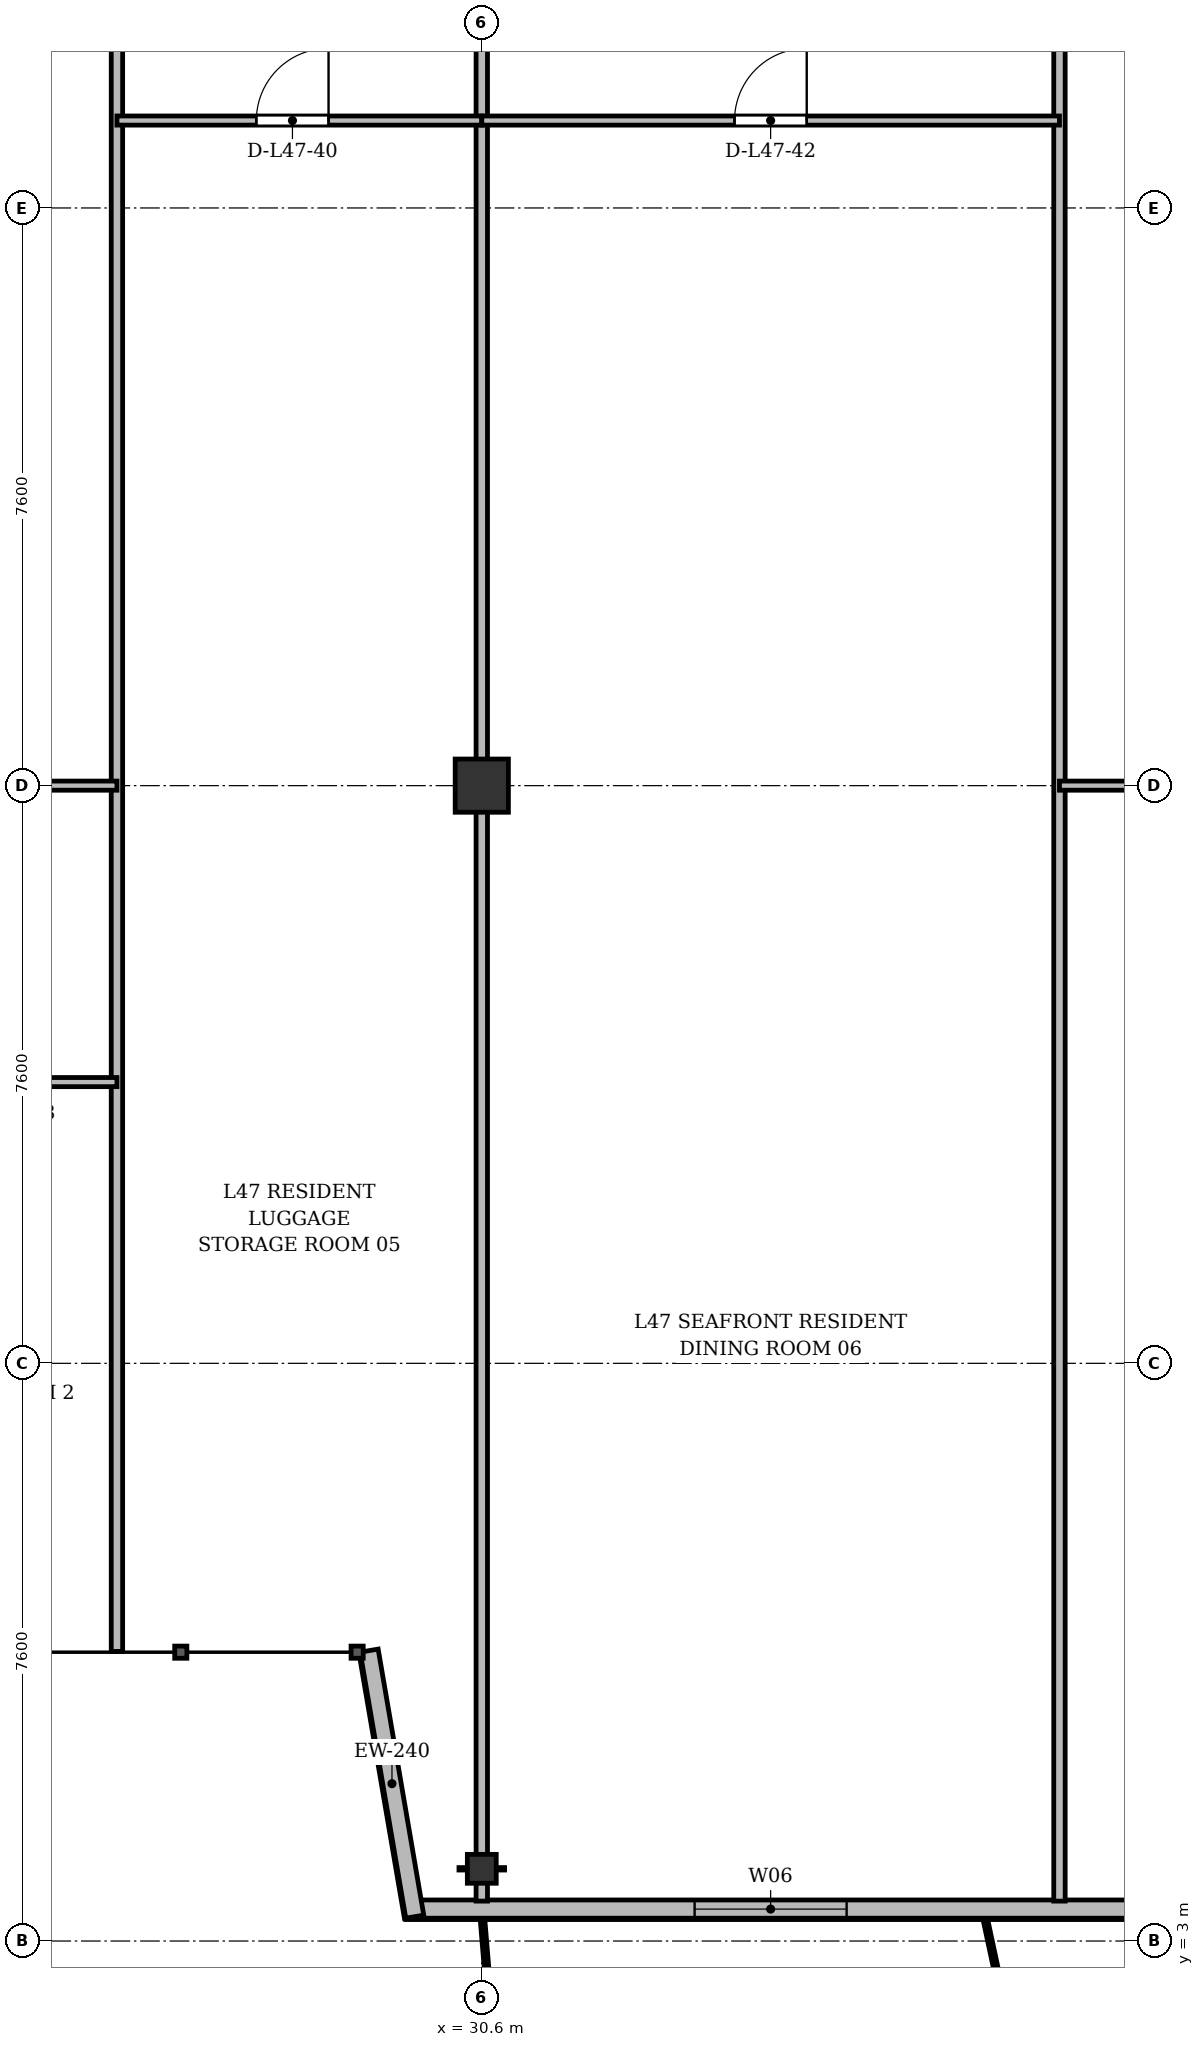
"""IFC4 building model, lengths in metres.
Left out: names, types, materials, properties, quantities, classifications, styles, units other than length and angle.
Written with IfcOpenShell. Run it as: python <this file> out.ifc"""

import sys

from ifc_helpers import new_model, si_unit, direction, frame, frame_2d, origin, origin_2d, place, context, subcontext, project, spatial, rectangle, i_section, extrude, source, transform, mapped, element, fill, save


model = new_model("IFC4")
c1 = context("Model", 3, precision=1e-05, world=origin(), true_north=direction((0.0, 1.0)))
c2 = subcontext(c1, "Body", "Model", "MODEL_VIEW")
j1 = project(units=[si_unit("LENGTHUNIT", "METRE"), si_unit("PLANEANGLEUNIT", "RADIAN")], contexts=[c1])
p1 = place(None, origin())
s1 = spatial("IfcSite", under=j1, at=p1, CompositionType="ELEMENT")
p2 = place(p1, origin())
s2 = spatial("IfcBuilding", under=s1, at=p2, CompositionType="ELEMENT")
p3 = place(p2, frame((0.0, 0.0, 178.9)))
s3 = spatial("IfcBuildingStorey", under=s2, at=p3, CompositionType="ELEMENT", Elevation=178.9)
m1 = source(origin(), c2, "Body", "SweptSolid", [
    extrude(i_section(OverallWidth=0.38, OverallDepth=0.38, WebThickness=0.02, FlangeThickness=0.03, at=origin_2d()), origin(), (0.0, 0.0, 1.0), 3.6),
])
p4 = place(p3, frame((30.6, 3.95, 0.0), z_axis=(0.0, 0.0, 1.0), x_axis=(1.0, 0.0, 0.0)))
e1 = element("IfcColumn", 1, at=p4, inside=s3, PredefinedType="COLUMN", context=c2, shape_type="MappedRepresentation", body=[
    mapped(m1, transform((0.0, 0.0, 0.0), x_axis=(1.0, 0.0, 0.0), y_axis=(0.0, 1.0, 0.0), z_axis=(0.0, 0.0, 1.0), scale=1.0)),
])
m2 = source(origin(), c2, "Body", "SweptSolid", [
    extrude(rectangle(XDim=0.7, YDim=0.7, at=origin_2d()), origin(), (0.0, 0.0, 1.0), 3.6),
])
p5 = place(p3, frame((30.6, 18.2, 0.0), z_axis=(0.0, 0.0, 1.0), x_axis=(1.0, 0.0, 0.0)))
e2 = element("IfcColumn", 2, at=p5, inside=s3, PredefinedType="COLUMN", context=c2, shape_type="MappedRepresentation", body=[
    mapped(m2, transform((0.0, 0.0, 0.0), x_axis=(1.0, 0.0, 0.0), y_axis=(0.0, 1.0, 0.0), z_axis=(0.0, 0.0, 1.0), scale=1.0)),
])
p6 = place(p3, frame((63.6, 3.42, 0.0), z_axis=(0.0, 0.0, 1.0), x_axis=(-1.0, 0.0, 0.0)))
e3 = element("IfcWall", 3, at=p6, inside=s3, PredefinedType="SOLIDWALL", context=c2, shape_type="SweptSolid", body=[
    extrude(rectangle(XDim=34.0, YDim=0.24, at=frame_2d((17.0, 0.0))), origin(), (0.0, 0.0, 1.0), 3.22),
])
p7 = place(p6, frame((2.995, 0.0, 0.9)))
e4 = element("IfcOpeningElement", 4, at=p7, cuts=e3, PredefinedType="OPENING", context=c2, shape_type="SweptSolid", body=[
    extrude(rectangle(XDim=1.5, YDim=1.75, at=frame_2d((0.75, 0.875))), frame((0.0, 0.13, 0.0), z_axis=(0.0, -1.0, 0.0), x_axis=(1.0, 0.0, 0.0)), (0.0, 0.0, 1.0), 0.26),
])
p8 = place(p6, frame((7.69, 0.0, 0.0)))
e5 = element("IfcOpeningElement", 5, at=p8, cuts=e3, PredefinedType="OPENING", context=c2, shape_type="SweptSolid", body=[
    extrude(rectangle(XDim=1.2, YDim=2.2, at=frame_2d((0.6, 1.1))), frame((0.0, 0.13, 0.0), z_axis=(0.0, -1.0, 0.0), x_axis=(1.0, 0.0, 0.0)), (0.0, 0.0, 1.0), 0.26),
])
p9 = place(p6, frame((10.175, 0.0, 0.9)))
e6 = element("IfcOpeningElement", 6, at=p9, cuts=e3, PredefinedType="OPENING", context=c2, shape_type="SweptSolid", body=[
    extrude(rectangle(XDim=1.65, YDim=1.85, at=frame_2d((0.825, 0.925))), frame((0.0, 0.13, 0.0), z_axis=(0.0, -1.0, 0.0), x_axis=(1.0, 0.0, 0.0)), (0.0, 0.0, 1.0), 0.26),
])
p10 = place(p6, frame((13.5, 0.0, 0.9)))
e7 = element("IfcOpeningElement", 7, at=p10, cuts=e3, PredefinedType="OPENING", context=c2, shape_type="SweptSolid", body=[
    extrude(rectangle(XDim=1.8, YDim=1.8, at=frame_2d((0.9, 0.9))), frame((0.0, 0.13, 0.0), z_axis=(0.0, -1.0, 0.0), x_axis=(1.0, 0.0, 0.0)), (0.0, 0.0, 1.0), 0.26),
])
p11 = place(p6, frame((16.9, 0.0, 0.9)))
e8 = element("IfcOpeningElement", 8, at=p11, cuts=e3, PredefinedType="OPENING", context=c2, shape_type="SweptSolid", body=[
    extrude(rectangle(XDim=2.2, YDim=1.8, at=frame_2d((1.1, 0.9))), frame((0.0, 0.13, 0.0), z_axis=(0.0, -1.0, 0.0), x_axis=(1.0, 0.0, 0.0)), (0.0, 0.0, 1.0), 0.26),
])
p12 = place(p6, frame((21.85, 0.0, 0.9)))
e9 = element("IfcOpeningElement", 9, at=p12, cuts=e3, PredefinedType="OPENING", context=c2, shape_type="SweptSolid", body=[
    extrude(rectangle(XDim=1.5, YDim=1.75, at=frame_2d((0.75, 0.875))), frame((0.0, 0.13, 0.0), z_axis=(0.0, -1.0, 0.0), x_axis=(1.0, 0.0, 0.0)), (0.0, 0.0, 1.0), 0.26),
])
p13 = place(p6, frame((28.2, 0.0, 0.9)))
e10 = element("IfcOpeningElement", 10, at=p13, cuts=e3, PredefinedType="OPENING", context=c2, shape_type="SweptSolid", body=[
    extrude(rectangle(XDim=2.0, YDim=1.95, at=frame_2d((1.0, 0.975))), frame((0.0, 0.13, 0.0), z_axis=(0.0, -1.0, 0.0), x_axis=(1.0, 0.0, 0.0)), (0.0, 0.0, 1.0), 0.26),
])
p14 = place(p3, frame((29.718, 3.32, 0.0), z_axis=(0.0, 0.0, 1.0), x_axis=(-0.168923741424, 0.98562912375, 0.0)))
e11 = element("IfcWall", 11, at=p14, inside=s3, PredefinedType="SOLIDWALL", context=c2, shape_type="SweptSolid", body=[
    extrude(rectangle(XDim=3.551, YDim=0.24, at=frame_2d((1.775, 0.0))), origin(), (0.0, 0.0, 1.0), 2.62),
])
p15 = place(p3, frame((25.8, 6.81, 0.0), z_axis=(0.0, 0.0, 1.0), x_axis=(0.0, 1.0, 0.0)))
e12 = element("IfcWall", 12, at=p15, inside=s3, PredefinedType="PARTITIONING", context=c2, shape_type="SweptSolid", body=[
    extrude(rectangle(XDim=23.99, YDim=0.15, at=frame_2d((11.995, 0.0))), origin(), (0.0, 0.0, 1.0), 2.62),
])
p16 = place(p3, frame((30.6, 3.525, 0.0), z_axis=(0.0, 0.0, 1.0), x_axis=(0.0, 1.0, 0.0)))
e13 = element("IfcWall", 13, at=p16, inside=s3, PredefinedType="PARTITIONING", context=c2, shape_type="SweptSolid", body=[
    extrude(rectangle(XDim=27.275, YDim=0.15, at=frame_2d((13.638, 0.0))), origin(), (0.0, 0.0, 1.0), 2.72),
])
p17 = place(p3, frame((38.2, 3.525, 0.0), z_axis=(0.0, 0.0, 1.0), x_axis=(0.0, 1.0, 0.0)))
e14 = element("IfcWall", 14, at=p17, inside=s3, PredefinedType="PARTITIONING", context=c2, shape_type="SweptSolid", body=[
    extrude(rectangle(XDim=27.275, YDim=0.15, at=frame_2d((13.638, 0.0))), origin(), (0.0, 0.0, 1.0), 2.62),
])
p18 = place(p3, frame((20.2, 18.2, 0.0), z_axis=(0.0, 0.0, 1.0), x_axis=(1.0, 0.0, 0.0)))
e15 = element("IfcWall", 15, at=p18, inside=s3, PredefinedType="PARTITIONING", context=c2, shape_type="SweptSolid", body=[
    extrude(rectangle(XDim=5.6, YDim=0.12, at=frame_2d((2.8, 0.0))), origin(), (0.0, 0.0, 1.0), 2.62),
])
p19 = place(p18, frame((1.306, 0.0, 0.0)))
e16 = element("IfcOpeningElement", 16, at=p19, cuts=e15, PredefinedType="OPENING", context=c2, shape_type="SweptSolid", body=[
    extrude(rectangle(XDim=0.95, YDim=2.15, at=frame_2d((0.475, 1.075))), frame((0.0, 0.07, 0.0), z_axis=(0.0, -1.0, 0.0), x_axis=(1.0, 0.0, 0.0)), (0.0, 0.0, 1.0), 0.14),
])
p20 = place(p3, frame((23.0, 14.3, 0.0), z_axis=(0.0, 0.0, 1.0), x_axis=(1.0, 0.0, 0.0)))
e17 = element("IfcWall", 17, at=p20, inside=s3, PredefinedType="PARTITIONING", context=c2, shape_type="SweptSolid", body=[
    extrude(rectangle(XDim=2.8, YDim=0.12, at=frame_2d((1.4, 0.0))), origin(), (0.0, 0.0, 1.0), 2.72),
])
p21 = place(p20, frame((0.925, 0.0, 0.0)))
e18 = element("IfcOpeningElement", 18, at=p21, cuts=e17, PredefinedType="OPENING", context=c2, shape_type="SweptSolid", body=[
    extrude(rectangle(XDim=0.95, YDim=2.15, at=frame_2d((0.475, 1.075))), frame((0.0, 0.07, 0.0), z_axis=(0.0, -1.0, 0.0), x_axis=(1.0, 0.0, 0.0)), (0.0, 0.0, 1.0), 0.14),
])
p22 = place(p3, frame((25.8, 26.95, 0.0), z_axis=(0.0, 0.0, 1.0), x_axis=(1.0, 0.0, 0.0)))
e19 = element("IfcWall", 19, at=p22, inside=s3, PredefinedType="PARTITIONING", context=c2, shape_type="SweptSolid", body=[
    extrude(rectangle(XDim=4.8, YDim=0.12, at=frame_2d((2.4, 0.0))), origin(), (0.0, 0.0, 1.0), 2.72),
])
p23 = place(p22, frame((1.834, 0.0, 0.0)))
e20 = element("IfcOpeningElement", 20, at=p23, cuts=e19, PredefinedType="OPENING", context=c2, shape_type="SweptSolid", body=[
    extrude(rectangle(XDim=0.95, YDim=2.15, at=frame_2d((0.475, 1.075))), frame((0.0, 0.07, 0.0), z_axis=(0.0, -1.0, 0.0), x_axis=(1.0, 0.0, 0.0)), (0.0, 0.0, 1.0), 0.14),
])
p24 = place(p3, frame((30.6, 26.95, 0.0), z_axis=(0.0, 0.0, 1.0), x_axis=(1.0, 0.0, 0.0)))
e21 = element("IfcWall", 21, at=p24, inside=s3, PredefinedType="PARTITIONING", context=c2, shape_type="SweptSolid", body=[
    extrude(rectangle(XDim=7.6, YDim=0.12, at=frame_2d((3.8, 0.0))), origin(), (0.0, 0.0, 1.0), 2.72),
])
p25 = place(p24, frame((3.325, 0.0, 0.0)))
e22 = element("IfcOpeningElement", 22, at=p25, cuts=e21, PredefinedType="OPENING", context=c2, shape_type="SweptSolid", body=[
    extrude(rectangle(XDim=0.95, YDim=2.15, at=frame_2d((0.475, 1.075))), frame((0.0, 0.07, 0.0), z_axis=(0.0, -1.0, 0.0), x_axis=(1.0, 0.0, 0.0)), (0.0, 0.0, 1.0), 0.14),
])
p26 = place(p3, frame((38.2, 18.2, 0.0), z_axis=(0.0, 0.0, 1.0), x_axis=(1.0, 0.0, 0.0)))
e23 = element("IfcWall", 23, at=p26, inside=s3, PredefinedType="PARTITIONING", context=c2, shape_type="SweptSolid", body=[
    extrude(rectangle(XDim=5.6, YDim=0.12, at=frame_2d((2.8, 0.0))), origin(), (0.0, 0.0, 1.0), 2.62),
])
p27 = place(p26, frame((2.232, 0.0, 0.0)))
e24 = element("IfcOpeningElement", 24, at=p27, cuts=e23, PredefinedType="OPENING", context=c2, shape_type="SweptSolid", body=[
    extrude(rectangle(XDim=0.95, YDim=2.15, at=frame_2d((0.475, 1.075))), frame((0.0, 0.07, 0.0), z_axis=(0.0, -1.0, 0.0), x_axis=(1.0, 0.0, 0.0)), (0.0, 0.0, 1.0), 0.14),
])
m3 = source(origin(), c2, "Body", "SweptSolid", [
    extrude(rectangle(XDim=2.0, YDim=1.95, at=frame_2d((1.0, 0.975))), frame((0.0, 0.03, 0.0), z_axis=(0.0, -1.0, 0.0), x_axis=(1.0, 0.0, 0.0)), (0.0, 0.0, 1.0), 0.06),
])
p28 = place(p13, origin())
e25 = element("IfcWindow", 25, at=p28, inside=s3, PartitioningType="SINGLE_PANEL", PredefinedType="WINDOW", context=c2, shape_type="MappedRepresentation", body=[
    mapped(m3, transform((0.0, 0.0, 0.0), x_axis=(1.0, 0.0, 0.0), y_axis=(0.0, 1.0, 0.0), z_axis=(0.0, 0.0, 1.0), scale=1.0)),
])
fill(e10, e25)
m4 = source(origin(), c2, "Body", "SweptSolid", [
    extrude(rectangle(XDim=0.95, YDim=2.15, at=frame_2d((0.475, 1.075))), frame((0.0, 0.025, 0.0), z_axis=(0.0, -1.0, 0.0), x_axis=(1.0, 0.0, 0.0)), (0.0, 0.0, 1.0), 0.05),
])
p29 = place(p23, origin())
e26 = element("IfcDoor", 26, at=p29, inside=s3, OperationType="SINGLE_SWING_RIGHT", PredefinedType="DOOR", context=c2, shape_type="MappedRepresentation", body=[
    mapped(m4, transform((0.0, 0.0, 0.0), x_axis=(1.0, 0.0, 0.0), y_axis=(0.0, 1.0, 0.0), z_axis=(0.0, 0.0, 1.0), scale=1.0)),
])
fill(e20, e26)
p30 = place(p25, origin())
e27 = element("IfcDoor", 27, at=p30, inside=s3, OperationType="SINGLE_SWING_RIGHT", PredefinedType="DOOR", context=c2, shape_type="MappedRepresentation", body=[
    mapped(m4, transform((0.0, 0.0, 0.0), x_axis=(1.0, 0.0, 0.0), y_axis=(0.0, 1.0, 0.0), z_axis=(0.0, 0.0, 1.0), scale=1.0)),
])
fill(e22, e27)
save(model, sys.argv[1])
